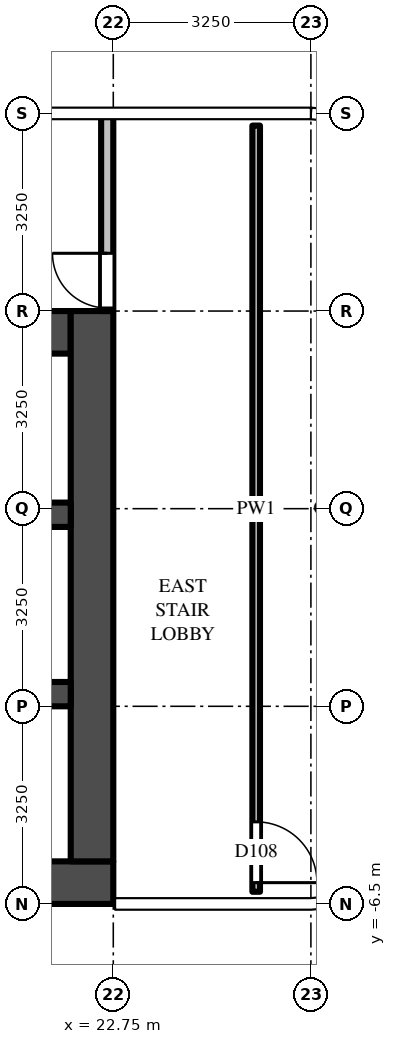
"""IFC4 building model, lengths in metres.
Left out: names, types, materials, properties, quantities, classifications, styles, units other than length and angle.
Written with IfcOpenShell. Run it as: python <this file> out.ifc"""

import sys

from ifc_helpers import new_model, si_unit, direction, frame, frame_2d, origin, place, context, subcontext, project, spatial, rectangle, extrude, source, transform, mapped, element, fill, save


model = new_model("IFC4")
c1 = context("Model", 3, precision=1e-05, world=origin(), true_north=direction((0.0, 1.0)))
c2 = subcontext(c1, "Body", "Model", "MODEL_VIEW")
j1 = project(units=[si_unit("LENGTHUNIT", "METRE"), si_unit("PLANEANGLEUNIT", "RADIAN")], contexts=[c1])
p1 = place(None, origin())
s1 = spatial("IfcSite", under=j1, at=p1, CompositionType="ELEMENT")
p2 = place(p1, origin())
s2 = spatial("IfcBuilding", under=s1, at=p2, CompositionType="ELEMENT")
p3 = place(p2, frame((0.0, 0.0, 173.7)))
s3 = spatial("IfcBuildingStorey", under=s2, at=p3, CompositionType="ELEMENT", Elevation=173.7)
m1 = source(origin(), c2, "Body", "SweptSolid", [
    extrude(rectangle(XDim=16.55, YDim=0.7, at=frame_2d((8.275, 0.0))), origin(), (0.0, 0.0, 1.0), 3.7),
])
p4 = place(p3, frame((6.2, -6.15, 0.0), z_axis=(0.0, 0.0, 1.0), x_axis=(1.0, 0.0, 0.0)))
e1 = element("IfcWall", 1, at=p4, inside=s3, PredefinedType="SHEAR", context=c2, shape_type="MappedRepresentation", body=[
    mapped(m1, transform((0.0, 0.0, 0.0))),
])
m2 = source(origin(), c2, "Body", "SweptSolid", [
    extrude(rectangle(XDim=14.85, YDim=0.7, at=frame_2d((7.425, 0.0))), origin(), (0.0, 0.0, 1.0), 3.7),
])
p5 = place(p3, frame((7.2, 2.9, 0.0), z_axis=(0.0, 0.0, 1.0), x_axis=(1.0, 0.0, 0.0)))
e2 = element("IfcWall", 2, at=p5, inside=s3, PredefinedType="SHEAR", context=c2, shape_type="MappedRepresentation", body=[
    mapped(m2, transform((0.0, 0.0, 0.0))),
])
m3 = source(origin(), c2, "Body", "SweptSolid", [
    extrude(rectangle(XDim=1.1, YDim=2.1, at=frame_2d((0.55, 1.05))), frame((0.0, 0.36, 0.0), z_axis=(0.0, -1.0, 0.0), x_axis=(1.0, 0.0, 0.0)), (0.0, 0.0, 1.0), 0.72),
])
p6 = place(p5, frame((0.55, 0.0, 0.0)))
e3 = element("IfcOpeningElement", 3, at=p6, cuts=e2, PredefinedType="OPENING", context=c2, shape_type="MappedRepresentation", body=[
    mapped(m3, transform((0.0, 0.0, 0.0))),
])
p7 = place(p5, frame((3.15, 0.0, 0.0)))
e4 = element("IfcOpeningElement", 4, at=p7, cuts=e2, PredefinedType="OPENING", context=c2, shape_type="MappedRepresentation", body=[
    mapped(m3, transform((0.0, 0.0, 0.0))),
])
m4 = source(origin(), c2, "Body", "SweptSolid", [
    extrude(rectangle(XDim=1.2, YDim=2.1, at=frame_2d((0.6, 1.05))), frame((0.0, 0.36, 0.0), z_axis=(0.0, -1.0, 0.0), x_axis=(1.0, 0.0, 0.0)), (0.0, 0.0, 1.0), 0.72),
])
p8 = place(p5, frame((5.7, 0.0, 0.0)))
e5 = element("IfcOpeningElement", 5, at=p8, cuts=e2, PredefinedType="OPENING", context=c2, shape_type="MappedRepresentation", body=[
    mapped(m4, transform((0.0, 0.0, 0.0))),
])
m5 = source(origin(), c2, "Body", "SweptSolid", [
    extrude(rectangle(XDim=1.3, YDim=2.1, at=frame_2d((0.65, 1.05))), frame((0.0, 0.36, 0.0), z_axis=(0.0, -1.0, 0.0), x_axis=(1.0, 0.0, 0.0)), (0.0, 0.0, 1.0), 0.72),
])
p9 = place(p5, frame((12.2, 0.0, 0.0)))
e6 = element("IfcOpeningElement", 6, at=p9, cuts=e2, PredefinedType="OPENING", context=c2, shape_type="MappedRepresentation", body=[
    mapped(m5, transform((0.0, 0.0, 0.0))),
])
p10 = place(p5, frame((9.85, 0.0, 0.0)))
e7 = element("IfcOpeningElement", 7, at=p10, cuts=e2, PredefinedType="OPENING", context=c2, shape_type="MappedRepresentation", body=[
    mapped(m4, transform((0.0, 0.0, 0.0))),
])
m6 = source(origin(), c2, "Body", "SweptSolid", [
    extrude(rectangle(XDim=1.0, YDim=2.1, at=frame_2d((0.5, 1.05))), frame((0.0, 0.36, 0.0), z_axis=(0.0, -1.0, 0.0), x_axis=(1.0, 0.0, 0.0)), (0.0, 0.0, 1.0), 0.72),
])
p11 = place(p5, frame((7.9, 0.0, 0.0)))
e8 = element("IfcOpeningElement", 8, at=p11, cuts=e2, PredefinedType="OPENING", context=c2, shape_type="MappedRepresentation", body=[
    mapped(m6, transform((0.0, 0.0, 0.0))),
])
m7 = source(origin(), c2, "Body", "SweptSolid", [
    extrude(rectangle(XDim=9.05, YDim=0.7, at=frame_2d((4.525, 0.0))), origin(), (0.0, 0.0, 1.0), 3.7),
])
p12 = place(p3, frame((22.4, -5.8, 0.0), z_axis=(0.0, 0.0, 1.0), x_axis=(0.0, 1.0, 0.0)))
e9 = element("IfcWall", 9, at=p12, inside=s3, PredefinedType="SHEAR", context=c2, shape_type="MappedRepresentation", body=[
    mapped(m7, transform((0.0, 0.0, 0.0))),
])
m8 = source(origin(), c2, "Body", "SweptSolid", [
    extrude(rectangle(XDim=14.85, YDim=0.4, at=frame_2d((7.425, 0.0))), origin(), (0.0, 0.0, 1.0), 3.7),
])
p13 = place(p3, frame((7.2, -0.1, 0.0), z_axis=(0.0, 0.0, 1.0), x_axis=(1.0, 0.0, 0.0)))
e10 = element("IfcWall", 10, at=p13, inside=s3, PredefinedType="SHEAR", context=c2, shape_type="MappedRepresentation", body=[
    mapped(m8, transform((0.0, 0.0, 0.0))),
])
m9 = source(origin(), c2, "Body", "SweptSolid", [
    extrude(rectangle(XDim=1.0, YDim=2.1, at=frame_2d((0.5, 1.05))), frame((0.0, 0.21, 0.0), z_axis=(0.0, -1.0, 0.0), x_axis=(1.0, 0.0, 0.0)), (0.0, 0.0, 1.0), 0.42),
])
p14 = place(p13, frame((7.9, 0.0, 0.0)))
e11 = element("IfcOpeningElement", 11, at=p14, cuts=e10, PredefinedType="OPENING", context=c2, shape_type="MappedRepresentation", body=[
    mapped(m9, transform((0.0, 0.0, 0.0))),
])
m10 = source(origin(), c2, "Body", "SweptSolid", [
    extrude(rectangle(XDim=5.7, YDim=0.4, at=frame_2d((2.85, 0.0))), origin(), (0.0, 0.0, 1.0), 3.7),
])
p15 = place(p3, frame((16.35, -3.05, 0.0), z_axis=(0.0, 0.0, 1.0), x_axis=(1.0, 0.0, 0.0)))
e12 = element("IfcWall", 12, at=p15, inside=s3, PredefinedType="SHEAR", context=c2, shape_type="MappedRepresentation", body=[
    mapped(m10, transform((0.0, 0.0, 0.0))),
])
m11 = source(origin(), c2, "Body", "SweptSolid", [
    extrude(rectangle(XDim=3.25, YDim=0.2, at=frame_2d((1.625, 0.0))), origin(), (0.0, 0.0, 1.0), 3.7),
])
p16 = place(p3, frame((22.65, 3.25, 0.0), z_axis=(0.0, 0.0, 1.0), x_axis=(0.0, 1.0, 0.0)))
e13 = element("IfcWall", 13, at=p16, inside=s3, PredefinedType="PARTITIONING", context=c2, shape_type="MappedRepresentation", body=[
    mapped(m11, transform((0.0, 0.0, 0.0))),
])
m12 = source(origin(), c2, "Body", "SweptSolid", [
    extrude(rectangle(XDim=0.9, YDim=2.1, at=frame_2d((0.45, 1.05))), frame((0.0, 0.11, 0.0), z_axis=(0.0, -1.0, 0.0), x_axis=(1.0, 0.0, 0.0)), (0.0, 0.0, 1.0), 0.22),
])
p17 = place(p16, frame((0.05, 0.0, 0.0)))
e14 = element("IfcOpeningElement", 14, at=p17, cuts=e13, PredefinedType="OPENING", context=c2, shape_type="MappedRepresentation", body=[
    mapped(m12, transform((0.0, 0.0, 0.0))),
])
m13 = source(origin(), c2, "Body", "SweptSolid", [
    extrude(rectangle(XDim=12.6, YDim=0.125, at=frame_2d((6.3, 0.0))), origin(), (0.0, 0.0, 1.0), 2.78),
])
p18 = place(p3, frame((25.1, 6.3, 0.0), z_axis=(0.0, 0.0, 1.0), x_axis=(0.0, -1.0, 0.0)))
e15 = element("IfcWall", 15, at=p18, inside=s3, PredefinedType="PARTITIONING", context=c2, shape_type="MappedRepresentation", body=[
    mapped(m13, transform((0.0, 0.0, 0.0))),
])
m14 = source(origin(), c2, "Body", "SweptSolid", [
    extrude(rectangle(XDim=1.0, YDim=2.1, at=frame_2d((0.5, 1.05))), frame((0.0, 0.073, 0.0), z_axis=(0.0, -1.0, 0.0), x_axis=(1.0, 0.0, 0.0)), (0.0, 0.0, 1.0), 0.145),
])
p19 = place(p18, frame((11.45, 0.0, 0.0)))
e16 = element("IfcOpeningElement", 16, at=p19, cuts=e15, PredefinedType="OPENING", context=c2, shape_type="MappedRepresentation", body=[
    mapped(m14, transform((0.0, 0.0, 0.0))),
])
m15 = source(origin(), c2, "Body", "SweptSolid", [
    extrude(rectangle(XDim=0.9, YDim=2.1, at=frame_2d((0.45, 1.05))), frame((0.0, 0.025, 0.0), z_axis=(0.0, -1.0, 0.0), x_axis=(1.0, 0.0, 0.0)), (0.0, 0.0, 1.0), 0.05),
])
p20 = place(p17, origin())
e17 = element("IfcDoor", 17, at=p20, inside=s3, OperationType="SINGLE_SWING_RIGHT", PredefinedType="DOOR", context=c2, shape_type="MappedRepresentation", body=[
    mapped(m15, transform((0.0, 0.0, 0.0))),
])
fill(e14, e17)
m16 = source(origin(), c2, "Body", "SweptSolid", [
    extrude(rectangle(XDim=1.0, YDim=2.1, at=frame_2d((0.5, 1.05))), frame((0.0, 0.025, 0.0), z_axis=(0.0, -1.0, 0.0), x_axis=(1.0, 0.0, 0.0)), (0.0, 0.0, 1.0), 0.05),
])
p21 = place(p19, origin())
e18 = element("IfcDoor", 18, at=p21, inside=s3, OperationType="SINGLE_SWING_RIGHT", PredefinedType="DOOR", context=c2, shape_type="MappedRepresentation", body=[
    mapped(m16, transform((0.0, 0.0, 0.0))),
])
fill(e16, e18)
save(model, sys.argv[1])
